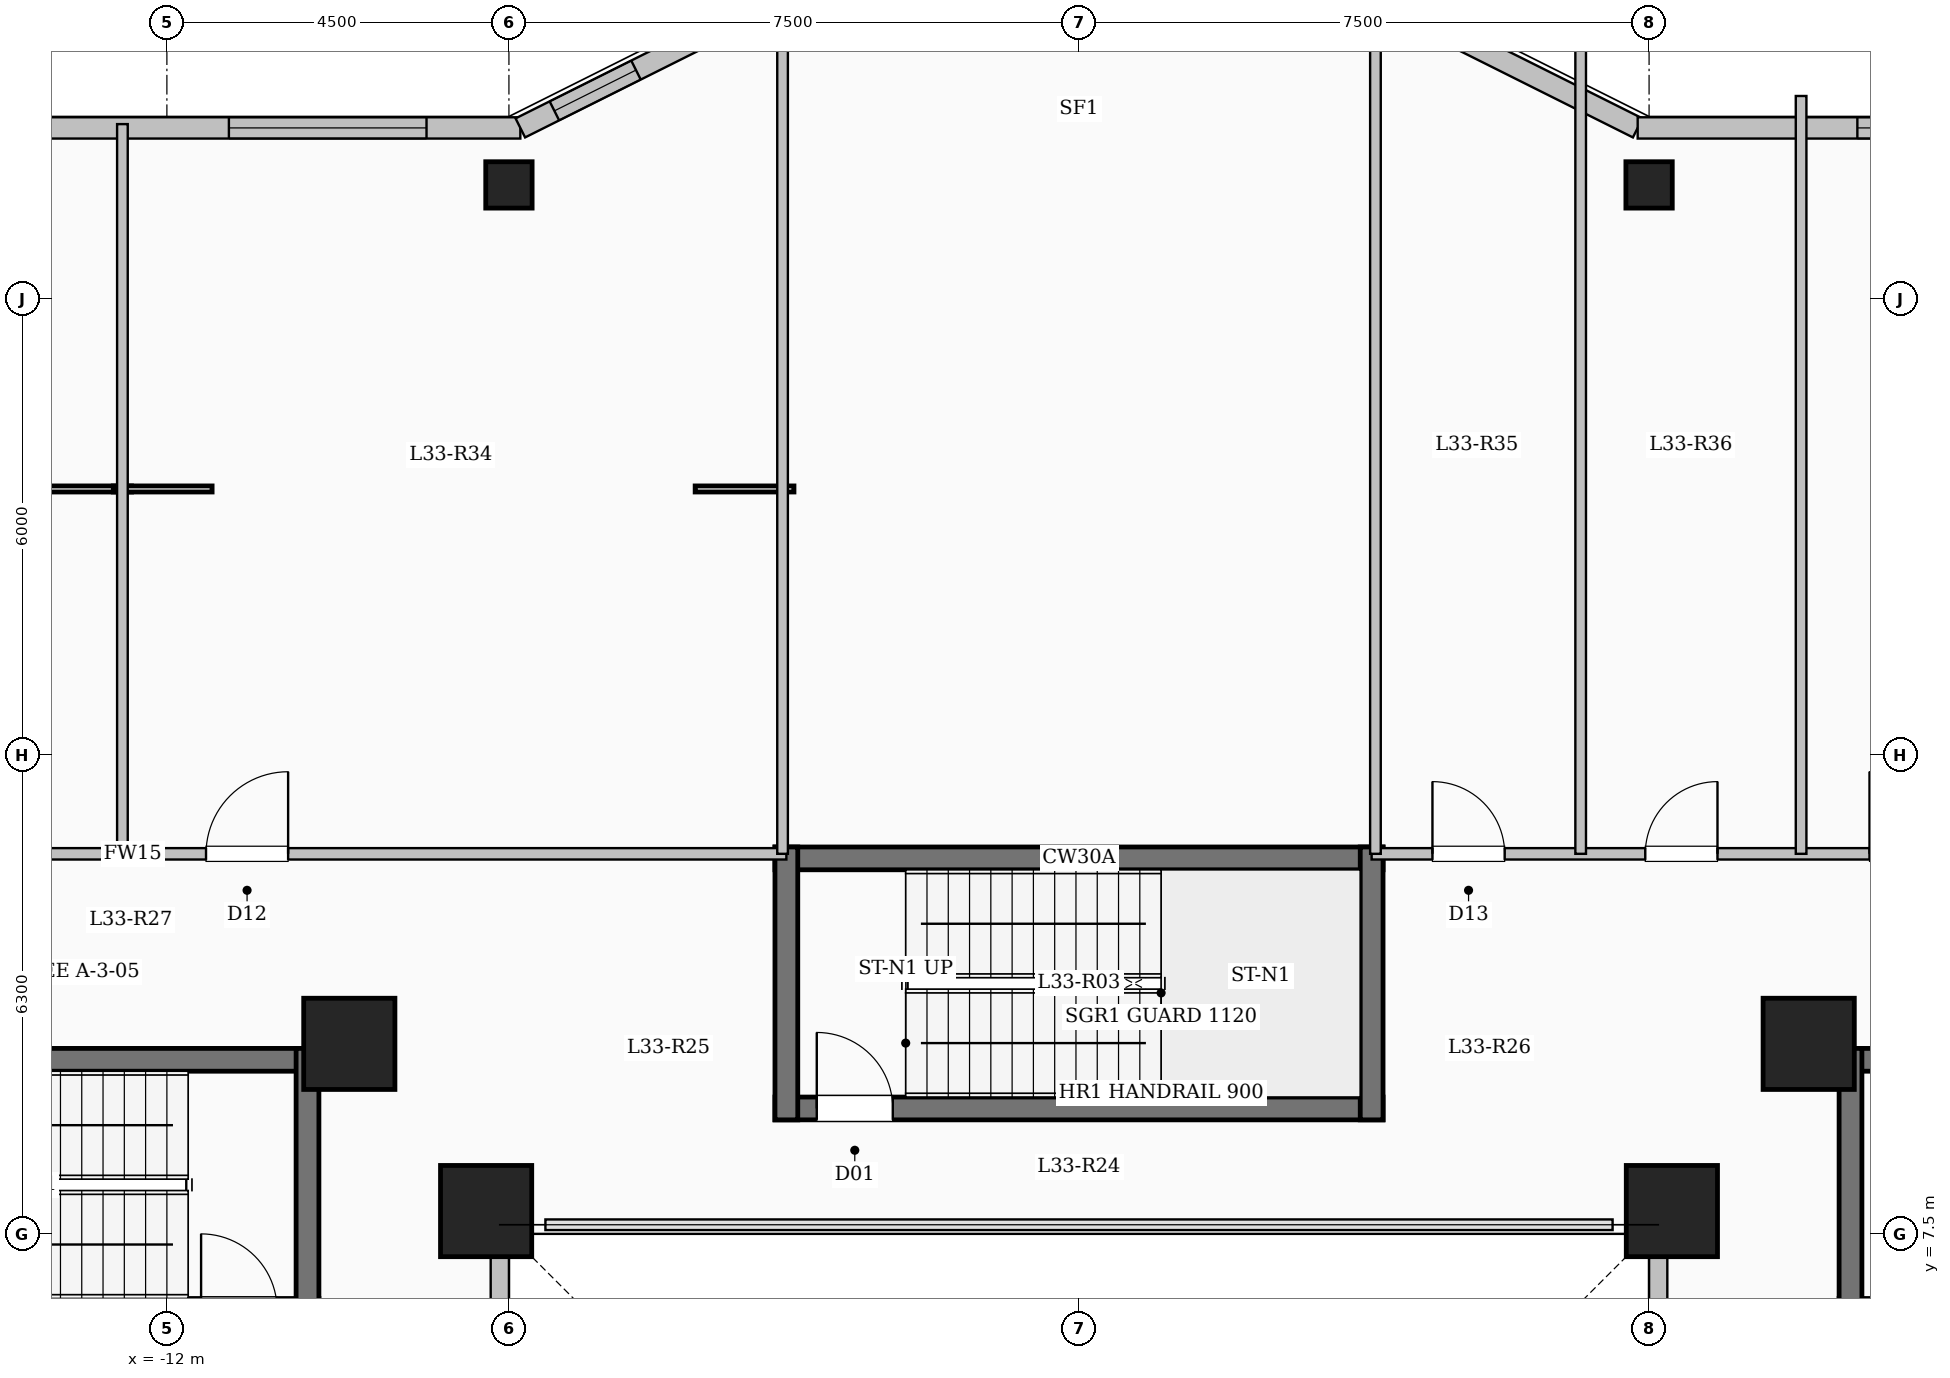
"""IFC4 building model, lengths in metres.
Left out: names, types, materials, properties, quantities, classifications, styles, units other than length and angle.
Written with IfcOpenShell. Run it as: python <this file> out.ifc"""

import sys

from ifc_helpers import new_model, si_unit, direction, frame, frame_2d, origin, origin_2d, place, context, subcontext, project, spatial, rectangle, hollow_circle, extrude, element, fill, save


model = new_model("IFC4")
c1 = context("Model", 3, precision=1e-05, world=origin(), true_north=direction((0.0, 1.0)))
c2 = subcontext(c1, "Body", "Model", "MODEL_VIEW")
j1 = project(units=[si_unit("LENGTHUNIT", "METRE"), si_unit("PLANEANGLEUNIT", "RADIAN")], contexts=[c1])
p1 = place(None, origin())
s1 = spatial("IfcSite", under=j1, at=p1, CompositionType="ELEMENT")
p2 = place(p1, origin())
s2 = spatial("IfcBuilding", under=s1, at=p2, CompositionType="ELEMENT")
p3 = place(p2, frame((0.0, 0.0, 123.0)))
s3 = spatial("IfcBuildingStorey", under=s2, at=p3, CompositionType="ELEMENT", Elevation=123.0)
for number, where, z_axis, x_axis in (
    (1, (-7.8, 7.8, 0.0), (0.0, 0.0, 1.0), (1.0, 0.0, 0.0)),
    (2, (7.8, 7.8, 0.0), (0.0, 0.0, 1.0), (1.0, 0.0, 0.0)),
    (3, (-9.6, 10.0, 0.0), (0.0, 0.0, 1.0), (1.0, 0.0, 0.0)),
    (4, (9.6, 10.0, 0.0), (0.0, 0.0, 1.0), (1.0, 0.0, 0.0)),
):
    element("IfcColumn", number, at=place(p3, frame(where, z_axis=z_axis, x_axis=x_axis)), inside=s3, PredefinedType="COLUMN", context=c2, shape_type="SweptSolid", body=[
        extrude(rectangle(XDim=1.2, YDim=1.2, at=origin_2d()), origin(), (0.0, 0.0, 1.0), 4.5),
    ])
for number, where, z_axis, x_axis in (
    (5, (-7.5, 21.3, 0.0), (0.0, 0.0, 1.0), (1.0, 0.0, 0.0)),
    (6, (7.5, 21.3, 0.0), (0.0, 0.0, 1.0), (1.0, 0.0, 0.0)),
):
    element("IfcColumn", number, at=place(p3, frame(where, z_axis=z_axis, x_axis=x_axis)), inside=s3, PredefinedType="COLUMN", context=c2, shape_type="SweptSolid", body=[
        extrude(hollow_circle(Radius=0.305, WallThickness=0.025, at=origin_2d()), origin(), (0.0, 0.0, 1.0), 4.5),
    ])
p4 = place(p3, frame((7.62, -7.62, 0.0), z_axis=(0.0, 0.0, 1.0), x_axis=(0.0, 1.0, 0.0)))
e7 = element("IfcWall", 7, at=p4, inside=s3, PredefinedType="SOLIDWALL", context=c2, shape_type="SweptSolid", body=[
    extrude(rectangle(XDim=15.24, YDim=0.24, at=frame_2d((7.62, 0.0))), origin(), (0.0, 0.0, 1.0), 4.2),
])
p5 = place(p4, frame((6.92, 0.0, 0.95)))
e8 = element("IfcOpeningElement", 8, at=p5, cuts=e7, PredefinedType="OPENING", context=c2, shape_type="SweptSolid", body=[
    extrude(rectangle(XDim=1.4, YDim=1.5, at=frame_2d((0.7, 0.75))), frame((0.0, 0.13, 0.0), z_axis=(0.0, -1.0, 0.0), x_axis=(1.0, 0.0, 0.0)), (0.0, 0.0, 1.0), 0.26),
])
p6 = place(p3, frame((-7.62, 7.62, 0.0), z_axis=(0.0, 0.0, 1.0), x_axis=(0.0, -1.0, 0.0)))
e9 = element("IfcWall", 9, at=p6, inside=s3, PredefinedType="SOLIDWALL", context=c2, shape_type="SweptSolid", body=[
    extrude(rectangle(XDim=15.24, YDim=0.24, at=frame_2d((7.62, 0.0))), origin(), (0.0, 0.0, 1.0), 4.2),
])
p7 = place(p6, frame((6.92, 0.0, 0.95)))
e10 = element("IfcOpeningElement", 10, at=p7, cuts=e9, PredefinedType="OPENING", context=c2, shape_type="SweptSolid", body=[
    extrude(rectangle(XDim=1.4, YDim=1.5, at=frame_2d((0.7, 0.75))), frame((0.0, 0.13, 0.0), z_axis=(0.0, -1.0, 0.0), x_axis=(1.0, 0.0, 0.0)), (0.0, 0.0, 1.0), 0.26),
])
p8 = place(p3, frame((-21.15, 22.05, 0.0), z_axis=(0.0, 0.0, 1.0), x_axis=(1.0, 0.0, 0.0)))
e11 = element("IfcWall", 11, at=p8, inside=s3, PredefinedType="SOLIDWALL", context=c2, shape_type="SweptSolid", body=[
    extrude(rectangle(XDim=13.8, YDim=0.28, at=frame_2d((6.9, 0.0))), origin(), (0.0, 0.0, 1.0), 4.2),
])
p9 = place(p8, frame((2.99, 0.0, 0.85)))
e12 = element("IfcOpeningElement", 12, at=p9, cuts=e11, PredefinedType="OPENING", context=c2, shape_type="SweptSolid", body=[
    extrude(rectangle(XDim=2.6, YDim=2.4, at=frame_2d((1.3, 1.2))), frame((0.0, 0.15, 0.0), z_axis=(0.0, -1.0, 0.0), x_axis=(1.0, 0.0, 0.0)), (0.0, 0.0, 1.0), 0.3),
])
p10 = place(p8, frame((9.966, 0.0, 0.85)))
e13 = element("IfcOpeningElement", 13, at=p10, cuts=e11, PredefinedType="OPENING", context=c2, shape_type="SweptSolid", body=[
    extrude(rectangle(XDim=2.6, YDim=2.4, at=frame_2d((1.3, 1.2))), frame((0.0, 0.15, 0.0), z_axis=(0.0, -1.0, 0.0), x_axis=(1.0, 0.0, 0.0)), (0.0, 0.0, 1.0), 0.3),
])
p11 = place(p3, frame((-7.35, 22.05, 0.0), z_axis=(0.0, 0.0, 1.0), x_axis=(0.894427191, 0.4472135955, 0.0)))
e14 = element("IfcWall", 14, at=p11, inside=s3, PredefinedType="SOLIDWALL", context=c2, shape_type="SweptSolid", body=[
    extrude(rectangle(XDim=3.354, YDim=0.28, at=frame_2d((1.677, 0.0))), origin(), (0.0, 0.0, 1.0), 4.2),
])
p12 = place(p11, frame((0.501, 0.0, 0.95)))
e15 = element("IfcOpeningElement", 15, at=p12, cuts=e14, PredefinedType="OPENING", context=c2, shape_type="SweptSolid", body=[
    extrude(rectangle(XDim=1.2, YDim=1.5, at=frame_2d((0.6, 0.75))), frame((0.0, 0.15, 0.0), z_axis=(0.0, -1.0, 0.0), x_axis=(1.0, 0.0, 0.0)), (0.0, 0.0, 1.0), 0.3),
])
p13 = place(p3, frame((4.35, 23.55, 0.0), z_axis=(0.0, 0.0, 1.0), x_axis=(0.894427191, -0.4472135955, 0.0)))
e16 = element("IfcWall", 16, at=p13, inside=s3, PredefinedType="SOLIDWALL", context=c2, shape_type="SweptSolid", body=[
    extrude(rectangle(XDim=3.354, YDim=0.28, at=frame_2d((1.677, 0.0))), origin(), (0.0, 0.0, 1.0), 4.2),
])
p14 = place(p3, frame((7.35, 22.05, 0.0), z_axis=(0.0, 0.0, 1.0), x_axis=(1.0, 0.0, 0.0)))
e17 = element("IfcWall", 17, at=p14, inside=s3, PredefinedType="SOLIDWALL", context=c2, shape_type="SweptSolid", body=[
    extrude(rectangle(XDim=13.8, YDim=0.28, at=frame_2d((6.9, 0.0))), origin(), (0.0, 0.0, 1.0), 4.2),
])
p15 = place(p14, frame((2.89, 0.0, 0.85)))
e18 = element("IfcOpeningElement", 18, at=p15, cuts=e17, PredefinedType="OPENING", context=c2, shape_type="SweptSolid", body=[
    extrude(rectangle(XDim=2.6, YDim=2.4, at=frame_2d((1.3, 1.2))), frame((0.0, 0.15, 0.0), z_axis=(0.0, -1.0, 0.0), x_axis=(1.0, 0.0, 0.0)), (0.0, 0.0, 1.0), 0.3),
])
p16 = place(p14, frame((8.686, 0.0, 0.85)))
e19 = element("IfcOpeningElement", 19, at=p16, cuts=e17, PredefinedType="OPENING", context=c2, shape_type="SweptSolid", body=[
    extrude(rectangle(XDim=2.6, YDim=2.4, at=frame_2d((1.3, 1.2))), frame((0.0, 0.15, 0.0), z_axis=(0.0, -1.0, 0.0), x_axis=(1.0, 0.0, 0.0)), (0.0, 0.0, 1.0), 0.3),
])
p17 = place(p3, frame((-18.0, 9.79, 0.0), z_axis=(0.0, 0.0, 1.0), x_axis=(1.0, 0.0, 0.0)))
e20 = element("IfcWall", 20, at=p17, inside=s3, PredefinedType="SHEAR", context=c2, shape_type="SweptSolid", body=[
    extrude(rectangle(XDim=8.0, YDim=0.3, at=frame_2d((4.0, 0.0))), origin(), (0.0, 0.0, 1.0), 4.5),
])
p18 = place(p3, frame((-18.0, 6.5, 0.0), z_axis=(0.0, 0.0, 1.0), x_axis=(1.0, 0.0, 0.0)))
e21 = element("IfcWall", 21, at=p18, inside=s3, PredefinedType="SHEAR", context=c2, shape_type="SweptSolid", body=[
    extrude(rectangle(XDim=8.0, YDim=0.3, at=frame_2d((4.0, 0.0))), origin(), (0.0, 0.0, 1.0), 4.5),
])
p19 = place(p18, frame((6.45, 0.0, 0.0)))
e22 = element("IfcOpeningElement", 22, at=p19, cuts=e21, PredefinedType="OPENING", context=c2, shape_type="SweptSolid", body=[
    extrude(rectangle(XDim=1.0, YDim=2.15, at=frame_2d((0.5, 1.075))), frame((0.0, 0.16, 0.0), z_axis=(0.0, -1.0, 0.0), x_axis=(1.0, 0.0, 0.0)), (0.0, 0.0, 1.0), 0.32),
])
p20 = place(p3, frame((-10.15, 6.35, 0.0), z_axis=(0.0, 0.0, 1.0), x_axis=(0.0, 1.0, 0.0)))
e23 = element("IfcWall", 23, at=p20, inside=s3, PredefinedType="SHEAR", context=c2, shape_type="SweptSolid", body=[
    extrude(rectangle(XDim=3.59, YDim=0.3, at=frame_2d((1.795, 0.0))), origin(), (0.0, 0.0, 1.0), 4.5),
])
p21 = place(p3, frame((10.0, 9.79, 0.0), z_axis=(0.0, 0.0, 1.0), x_axis=(1.0, 0.0, 0.0)))
e24 = element("IfcWall", 24, at=p21, inside=s3, PredefinedType="SHEAR", context=c2, shape_type="SweptSolid", body=[
    extrude(rectangle(XDim=8.0, YDim=0.3, at=frame_2d((4.0, 0.0))), origin(), (0.0, 0.0, 1.0), 4.5),
])
p22 = place(p3, frame((10.0, 6.5, 0.0), z_axis=(0.0, 0.0, 1.0), x_axis=(1.0, 0.0, 0.0)))
e25 = element("IfcWall", 25, at=p22, inside=s3, PredefinedType="SHEAR", context=c2, shape_type="SweptSolid", body=[
    extrude(rectangle(XDim=8.0, YDim=0.3, at=frame_2d((4.0, 0.0))), origin(), (0.0, 0.0, 1.0), 4.5),
])
p23 = place(p22, frame((0.55, 0.0, 0.0)))
e26 = element("IfcOpeningElement", 26, at=p23, cuts=e25, PredefinedType="OPENING", context=c2, shape_type="SweptSolid", body=[
    extrude(rectangle(XDim=1.0, YDim=2.15, at=frame_2d((0.5, 1.075))), frame((0.0, 0.16, 0.0), z_axis=(0.0, -1.0, 0.0), x_axis=(1.0, 0.0, 0.0)), (0.0, 0.0, 1.0), 0.32),
])
p24 = place(p3, frame((10.15, 6.35, 0.0), z_axis=(0.0, 0.0, 1.0), x_axis=(0.0, 1.0, 0.0)))
e27 = element("IfcWall", 27, at=p24, inside=s3, PredefinedType="SHEAR", context=c2, shape_type="SweptSolid", body=[
    extrude(rectangle(XDim=3.59, YDim=0.3, at=frame_2d((1.795, 0.0))), origin(), (0.0, 0.0, 1.0), 4.5),
])
p25 = place(p3, frame((-4.0, 12.44, 0.0), z_axis=(0.0, 0.0, 1.0), x_axis=(1.0, 0.0, 0.0)))
e28 = element("IfcWall", 28, at=p25, inside=s3, PredefinedType="SHEAR", context=c2, shape_type="SweptSolid", body=[
    extrude(rectangle(XDim=8.0, YDim=0.3, at=frame_2d((4.0, 0.0))), origin(), (0.0, 0.0, 1.0), 4.5),
])
p26 = place(p3, frame((-4.0, 9.15, 0.0), z_axis=(0.0, 0.0, 1.0), x_axis=(1.0, 0.0, 0.0)))
e29 = element("IfcWall", 29, at=p26, inside=s3, PredefinedType="SHEAR", context=c2, shape_type="SweptSolid", body=[
    extrude(rectangle(XDim=8.0, YDim=0.3, at=frame_2d((4.0, 0.0))), origin(), (0.0, 0.0, 1.0), 4.5),
])
p27 = place(p26, frame((0.55, 0.0, 0.0)))
e30 = element("IfcOpeningElement", 30, at=p27, cuts=e29, PredefinedType="OPENING", context=c2, shape_type="SweptSolid", body=[
    extrude(rectangle(XDim=1.0, YDim=2.15, at=frame_2d((0.5, 1.075))), frame((0.0, 0.16, 0.0), z_axis=(0.0, -1.0, 0.0), x_axis=(1.0, 0.0, 0.0)), (0.0, 0.0, 1.0), 0.32),
])
for number, where, z_axis, x_axis in (
    (31, (-3.85, 9.0, 0.0), (0.0, 0.0, 1.0), (0.0, 1.0, 0.0)),
    (32, (3.85, 9.0, 0.0), (0.0, 0.0, 1.0), (0.0, 1.0, 0.0)),
):
    element("IfcWall", number, at=place(p3, frame(where, z_axis=z_axis, x_axis=x_axis)), inside=s3, PredefinedType="SHEAR", context=c2, shape_type="SweptSolid", body=[
        extrude(rectangle(XDim=3.59, YDim=0.3, at=frame_2d((1.795, 0.0))), origin(), (0.0, 0.0, 1.0), 4.5),
    ])
p28 = place(p3, frame((-21.05, 12.5, 0.0), z_axis=(0.0, 0.0, 1.0), x_axis=(1.0, 0.0, 0.0)))
e33 = element("IfcWall", 33, at=p28, inside=s3, PredefinedType="PARTITIONING", context=c2, shape_type="SweptSolid", body=[
    extrude(rectangle(XDim=17.2, YDim=0.15, at=frame_2d((8.6, 0.0))), origin(), (0.0, 0.0, 1.0), 4.2),
])
p29 = place(p28, frame((1.2, 0.0, 0.0)))
e34 = element("IfcOpeningElement", 34, at=p29, cuts=e33, PredefinedType="OPENING", context=c2, shape_type="SweptSolid", body=[
    extrude(rectangle(XDim=1.2, YDim=2.15, at=frame_2d((0.6, 1.075))), frame((0.0, 0.085, 0.0), z_axis=(0.0, -1.0, 0.0), x_axis=(1.0, 0.0, 0.0)), (0.0, 0.0, 1.0), 0.17),
])
p30 = place(p28, frame((9.565, 0.0, 0.0)))
e35 = element("IfcOpeningElement", 35, at=p30, cuts=e33, PredefinedType="OPENING", context=c2, shape_type="SweptSolid", body=[
    extrude(rectangle(XDim=1.08, YDim=2.15, at=frame_2d((0.54, 1.075))), frame((0.0, 0.085, 0.0), z_axis=(0.0, -1.0, 0.0), x_axis=(1.0, 0.0, 0.0)), (0.0, 0.0, 1.0), 0.17),
])
p31 = place(p3, frame((3.85, 12.5, 0.0), z_axis=(0.0, 0.0, 1.0), x_axis=(1.0, 0.0, 0.0)))
e36 = element("IfcWall", 36, at=p31, inside=s3, PredefinedType="PARTITIONING", context=c2, shape_type="SweptSolid", body=[
    extrude(rectangle(XDim=17.2, YDim=0.15, at=frame_2d((8.6, 0.0))), origin(), (0.0, 0.0, 1.0), 4.2),
])
p32 = place(p31, frame((0.8, 0.0, 0.0)))
e37 = element("IfcOpeningElement", 37, at=p32, cuts=e36, PredefinedType="OPENING", context=c2, shape_type="SweptSolid", body=[
    extrude(rectangle(XDim=0.95, YDim=2.15, at=frame_2d((0.475, 1.075))), frame((0.0, 0.085, 0.0), z_axis=(0.0, -1.0, 0.0), x_axis=(1.0, 0.0, 0.0)), (0.0, 0.0, 1.0), 0.17),
])
p33 = place(p31, frame((3.6, 0.0, 0.0)))
e38 = element("IfcOpeningElement", 38, at=p33, cuts=e36, PredefinedType="OPENING", context=c2, shape_type="SweptSolid", body=[
    extrude(rectangle(XDim=0.95, YDim=2.15, at=frame_2d((0.475, 1.075))), frame((0.0, 0.085, 0.0), z_axis=(0.0, -1.0, 0.0), x_axis=(1.0, 0.0, 0.0)), (0.0, 0.0, 1.0), 0.17),
])
p34 = place(p31, frame((6.55, 0.0, 0.0)))
e39 = element("IfcOpeningElement", 39, at=p34, cuts=e36, PredefinedType="OPENING", context=c2, shape_type="SweptSolid", body=[
    extrude(rectangle(XDim=1.08, YDim=2.15, at=frame_2d((0.54, 1.075))), frame((0.0, 0.085, 0.0), z_axis=(0.0, -1.0, 0.0), x_axis=(1.0, 0.0, 0.0)), (0.0, 0.0, 1.0), 0.17),
])
p35 = place(p31, frame((10.793, 0.0, 0.0)))
e40 = element("IfcOpeningElement", 40, at=p35, cuts=e36, PredefinedType="OPENING", context=c2, shape_type="SweptSolid", body=[
    extrude(rectangle(XDim=1.2, YDim=2.15, at=frame_2d((0.6, 1.075))), frame((0.0, 0.085, 0.0), z_axis=(0.0, -1.0, 0.0), x_axis=(1.0, 0.0, 0.0)), (0.0, 0.0, 1.0), 0.17),
])
for number, where, z_axis, x_axis in (
    (41, (-3.9, 12.5, 0.0), (0.0, 0.0, 1.0), (0.0, 1.0, 0.0)),
    (42, (3.9, 12.5, 0.0), (0.0, 0.0, 1.0), (0.0, 1.0, 0.0)),
):
    element("IfcWall", number, at=place(p3, frame(where, z_axis=z_axis, x_axis=x_axis)), inside=s3, PredefinedType="PARTITIONING", context=c2, shape_type="SweptSolid", body=[
        extrude(rectangle(XDim=11.08, YDim=0.14, at=frame_2d((5.54, 0.0))), origin(), (0.0, 0.0, 1.0), 4.2),
    ])
p36 = place(p3, frame((-12.585, 12.5, 0.0), z_axis=(0.0, 0.0, 1.0), x_axis=(0.0, 1.0, 0.0)))
e43 = element("IfcWall", 43, at=p36, inside=s3, PredefinedType="PARTITIONING", context=c2, shape_type="SweptSolid", body=[
    extrude(rectangle(XDim=9.6, YDim=0.14, at=frame_2d((4.8, 0.0))), origin(), (0.0, 0.0, 1.0), 4.2),
])
p37 = place(p3, frame((6.6, 12.5, 0.0), z_axis=(0.0, 0.0, 1.0), x_axis=(0.0, 1.0, 0.0)))
e44 = element("IfcWall", 44, at=p37, inside=s3, PredefinedType="PARTITIONING", context=c2, shape_type="SweptSolid", body=[
    extrude(rectangle(XDim=10.685, YDim=0.14, at=frame_2d((5.343, 0.0))), origin(), (0.0, 0.0, 1.0), 4.2),
])
p38 = place(p3, frame((9.5, 12.5, 0.0), z_axis=(0.0, 0.0, 1.0), x_axis=(0.0, 1.0, 0.0)))
e45 = element("IfcWall", 45, at=p38, inside=s3, PredefinedType="PARTITIONING", context=c2, shape_type="SweptSolid", body=[
    extrude(rectangle(XDim=9.97, YDim=0.14, at=frame_2d((4.985, 0.0))), origin(), (0.0, 0.0, 1.0), 4.2),
])
p39 = place(p10, origin())
e46 = element("IfcWindow", 46, at=p39, inside=s3, PartitioningType="SINGLE_PANEL", PredefinedType="WINDOW", context=c2, shape_type="SweptSolid", body=[
    extrude(rectangle(XDim=2.6, YDim=2.4, at=frame_2d((1.3, 1.2))), frame((0.0, 0.03, 0.0), z_axis=(0.0, -1.0, 0.0), x_axis=(1.0, 0.0, 0.0)), (0.0, 0.0, 1.0), 0.06),
])
fill(e13, e46)
p40 = place(p12, origin())
e47 = element("IfcWindow", 47, at=p40, inside=s3, PartitioningType="SINGLE_PANEL", PredefinedType="WINDOW", context=c2, shape_type="SweptSolid", body=[
    extrude(rectangle(XDim=1.2, YDim=1.5, at=frame_2d((0.6, 0.75))), frame((0.0, 0.03, 0.0), z_axis=(0.0, -1.0, 0.0), x_axis=(1.0, 0.0, 0.0)), (0.0, 0.0, 1.0), 0.06),
])
fill(e15, e47)
p41 = place(p15, origin())
e48 = element("IfcWindow", 48, at=p41, inside=s3, PartitioningType="SINGLE_PANEL", PredefinedType="WINDOW", context=c2, shape_type="SweptSolid", body=[
    extrude(rectangle(XDim=2.6, YDim=2.4, at=frame_2d((1.3, 1.2))), frame((0.0, 0.03, 0.0), z_axis=(0.0, -1.0, 0.0), x_axis=(1.0, 0.0, 0.0)), (0.0, 0.0, 1.0), 0.06),
])
fill(e18, e48)
p42 = place(p27, origin())
e49 = element("IfcDoor", 49, at=p42, inside=s3, OperationType="SINGLE_SWING_LEFT", PredefinedType="DOOR", context=c2, shape_type="SweptSolid", body=[
    extrude(rectangle(XDim=1.0, YDim=2.15, at=frame_2d((0.5, 1.075))), frame((0.0, 0.025, 0.0), z_axis=(0.0, -1.0, 0.0), x_axis=(1.0, 0.0, 0.0)), (0.0, 0.0, 1.0), 0.05),
])
fill(e30, e49)
p43 = place(p30, origin())
e50 = element("IfcDoor", 50, at=p43, inside=s3, OperationType="SINGLE_SWING_RIGHT", PredefinedType="DOOR", context=c2, shape_type="SweptSolid", body=[
    extrude(rectangle(XDim=1.08, YDim=2.15, at=frame_2d((0.54, 1.075))), frame((0.0, 0.025, 0.0), z_axis=(0.0, -1.0, 0.0), x_axis=(1.0, 0.0, 0.0)), (0.0, 0.0, 1.0), 0.05),
])
fill(e35, e50)
p44 = place(p32, origin())
e51 = element("IfcDoor", 51, at=p44, inside=s3, OperationType="SINGLE_SWING_LEFT", PredefinedType="DOOR", context=c2, shape_type="SweptSolid", body=[
    extrude(rectangle(XDim=0.95, YDim=2.15, at=frame_2d((0.475, 1.075))), frame((0.0, 0.025, 0.0), z_axis=(0.0, -1.0, 0.0), x_axis=(1.0, 0.0, 0.0)), (0.0, 0.0, 1.0), 0.05),
])
fill(e37, e51)
p45 = place(p33, origin())
e52 = element("IfcDoor", 52, at=p45, inside=s3, OperationType="SINGLE_SWING_RIGHT", PredefinedType="DOOR", context=c2, shape_type="SweptSolid", body=[
    extrude(rectangle(XDim=0.95, YDim=2.15, at=frame_2d((0.475, 1.075))), frame((0.0, 0.025, 0.0), z_axis=(0.0, -1.0, 0.0), x_axis=(1.0, 0.0, 0.0)), (0.0, 0.0, 1.0), 0.05),
])
fill(e38, e52)
p46 = place(p34, origin())
e53 = element("IfcDoor", 53, at=p46, inside=s3, OperationType="SINGLE_SWING_LEFT", PredefinedType="DOOR", context=c2, shape_type="SweptSolid", body=[
    extrude(rectangle(XDim=1.08, YDim=2.15, at=frame_2d((0.54, 1.075))), frame((0.0, 0.025, 0.0), z_axis=(0.0, -1.0, 0.0), x_axis=(1.0, 0.0, 0.0)), (0.0, 0.0, 1.0), 0.05),
])
fill(e39, e53)
save(model, sys.argv[1])
